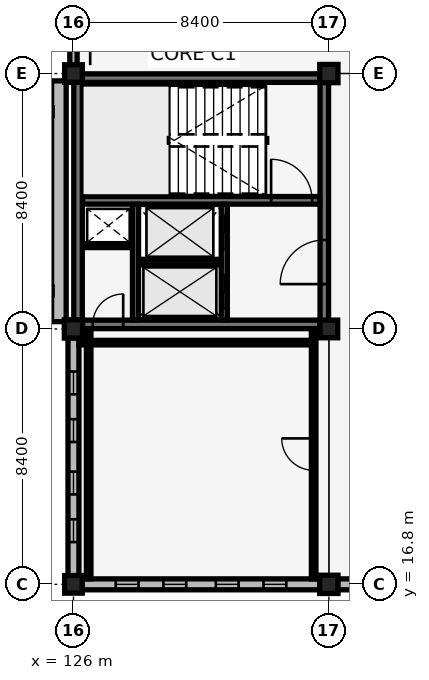
"""IFC4 building model, lengths in metres.
Left out: names, types, materials, properties, quantities, classifications, styles, units other than length and angle.
Written with IfcOpenShell. Run it as: python <this file> out.ifc"""

import sys

from ifc_helpers import new_model, si_unit, direction, frame, frame_2d, origin, origin_2d, place, context, subcontext, project, spatial, rectangle, extrude, element, fill, save


model = new_model("IFC4")
c1 = context("Model", 3, precision=1e-05, world=origin(), true_north=direction((0.0, 1.0)))
c2 = subcontext(c1, "Body", "Model", "MODEL_VIEW")
j1 = project(units=[si_unit("LENGTHUNIT", "METRE"), si_unit("PLANEANGLEUNIT", "RADIAN")], contexts=[c1])
p1 = place(None, origin())
s1 = spatial("IfcSite", under=j1, at=p1, CompositionType="ELEMENT")
p2 = place(p1, origin())
s2 = spatial("IfcBuilding", under=s1, at=p2, CompositionType="ELEMENT")
p3 = place(p2, frame((0.0, 0.0, 18.02)))
s3 = spatial("IfcBuildingStorey", under=s2, at=p3, CompositionType="ELEMENT", Elevation=18.02)
p4 = place(p3, frame((126.15, 25.35, 0.0), z_axis=(0.0, 0.0, 1.0), x_axis=(1.0, 0.0, 0.0)))
e1 = element("IfcWall", 1, at=p4, inside=s3, PredefinedType="SHEAR", context=c2, shape_type="SweptSolid", body=[
    extrude(rectangle(XDim=8.1, YDim=0.28, at=frame_2d((4.05, 0.0))), origin(), (0.0, 0.0, 1.0), 3.78),
])
p5 = place(p4, frame((0.485, 0.0, 0.0)))
e2 = element("IfcOpeningElement", 2, at=p5, cuts=e1, PredefinedType="OPENING", context=c2, shape_type="SweptSolid", body=[
    extrude(rectangle(XDim=1.0, YDim=2.15, at=frame_2d((0.5, 1.075))), frame((0.0, 0.15, 0.0), z_axis=(0.0, -1.0, 0.0), x_axis=(1.0, 0.0, 0.0)), (0.0, 0.0, 1.0), 0.3),
])
p6 = place(p3, frame((126.15, 33.45, 0.0), z_axis=(0.0, 0.0, 1.0), x_axis=(1.0, 0.0, 0.0)))
e3 = element("IfcWall", 3, at=p6, inside=s3, PredefinedType="SHEAR", context=c2, shape_type="SweptSolid", body=[
    extrude(rectangle(XDim=8.1, YDim=0.28, at=frame_2d((4.05, 0.0))), origin(), (0.0, 0.0, 1.0), 3.78),
])
p7 = place(p3, frame((126.15, 25.35, 0.0), z_axis=(0.0, 0.0, 1.0), x_axis=(0.0, 1.0, 0.0)))
e4 = element("IfcWall", 4, at=p7, inside=s3, PredefinedType="SHEAR", context=c2, shape_type="SweptSolid", body=[
    extrude(rectangle(XDim=8.1, YDim=0.28, at=frame_2d((4.05, 0.0))), origin(), (0.0, 0.0, 1.0), 3.78),
])
p8 = place(p3, frame((134.25, 25.35, 0.0), z_axis=(0.0, 0.0, 1.0), x_axis=(0.0, 1.0, 0.0)))
e5 = element("IfcWall", 5, at=p8, inside=s3, PredefinedType="SHEAR", context=c2, shape_type="SweptSolid", body=[
    extrude(rectangle(XDim=8.1, YDim=0.28, at=frame_2d((4.05, 0.0))), origin(), (0.0, 0.0, 1.0), 3.78),
])
p9 = place(p8, frame((1.325, 0.0, 0.0)))
e6 = element("IfcOpeningElement", 6, at=p9, cuts=e5, PredefinedType="OPENING", context=c2, shape_type="SweptSolid", body=[
    extrude(rectangle(XDim=1.45, YDim=2.15, at=frame_2d((0.725, 1.075))), frame((0.0, 0.15, 0.0), z_axis=(0.0, -1.0, 0.0), x_axis=(1.0, 0.0, 0.0)), (0.0, 0.0, 1.0), 0.3),
])
p10 = place(p3, frame((126.3, 29.43, 0.0), z_axis=(0.0, 0.0, 1.0), x_axis=(1.0, 0.0, 0.0)))
e7 = element("IfcWall", 7, at=p10, inside=s3, PredefinedType="SHEAR", context=c2, shape_type="SweptSolid", body=[
    extrude(rectangle(XDim=7.8, YDim=0.25, at=frame_2d((3.9, 0.0))), origin(), (0.0, 0.0, 1.0), 3.78),
])
p11 = place(p10, frame((6.2, 0.0, 0.0)))
e8 = element("IfcOpeningElement", 8, at=p11, cuts=e7, PredefinedType="OPENING", context=c2, shape_type="SweptSolid", body=[
    extrude(rectangle(XDim=1.35, YDim=2.15, at=frame_2d((0.675, 1.075))), frame((0.0, 0.135, 0.0), z_axis=(0.0, -1.0, 0.0), x_axis=(1.0, 0.0, 0.0)), (0.0, 0.0, 1.0), 0.27),
])
p12 = place(p3, frame((126.0, 16.8, 0.0), z_axis=(0.0, 0.0, 1.0), x_axis=(1.0, 0.0, 0.0)))
e9 = element("IfcColumn", 9, at=p12, inside=s3, PredefinedType="COLUMN", context=c2, shape_type="SweptSolid", body=[
    extrude(rectangle(XDim=0.58, YDim=0.58, at=origin_2d()), origin(), (0.0, 0.0, 1.0), 3.78),
])
p13 = place(p3, frame((126.0, 25.2, 0.0), z_axis=(0.0, 0.0, 1.0), x_axis=(1.0, 0.0, 0.0)))
e10 = element("IfcColumn", 10, at=p13, inside=s3, PredefinedType="COLUMN", context=c2, shape_type="SweptSolid", body=[
    extrude(rectangle(XDim=0.6, YDim=0.6, at=origin_2d()), origin(), (0.0, 0.0, 1.0), 3.78),
])
p14 = place(p3, frame((126.0, 33.6, 0.0), z_axis=(0.0, 0.0, 1.0), x_axis=(1.0, 0.0, 0.0)))
e11 = element("IfcColumn", 11, at=p14, inside=s3, PredefinedType="COLUMN", context=c2, shape_type="SweptSolid", body=[
    extrude(rectangle(XDim=0.58, YDim=0.58, at=origin_2d()), origin(), (0.0, 0.0, 1.0), 3.78),
])
p15 = place(p3, frame((134.4, 16.8, 0.0), z_axis=(0.0, 0.0, 1.0), x_axis=(1.0, 0.0, 0.0)))
e12 = element("IfcColumn", 12, at=p15, inside=s3, PredefinedType="COLUMN", context=c2, shape_type="SweptSolid", body=[
    extrude(rectangle(XDim=0.6, YDim=0.6, at=origin_2d()), origin(), (0.0, 0.0, 1.0), 3.78),
])
p16 = place(p3, frame((134.4, 25.2, 0.0), z_axis=(0.0, 0.0, 1.0), x_axis=(1.0, 0.0, 0.0)))
e13 = element("IfcColumn", 13, at=p16, inside=s3, PredefinedType="COLUMN", context=c2, shape_type="SweptSolid", body=[
    extrude(rectangle(XDim=0.58, YDim=0.58, at=origin_2d()), origin(), (0.0, 0.0, 1.0), 3.78),
])
p17 = place(p3, frame((134.4, 33.6, 0.0), z_axis=(0.0, 0.0, 1.0), x_axis=(1.0, 0.0, 0.0)))
e14 = element("IfcColumn", 14, at=p17, inside=s3, PredefinedType="COLUMN", context=c2, shape_type="SweptSolid", body=[
    extrude(rectangle(XDim=0.6, YDim=0.6, at=origin_2d()), origin(), (0.0, 0.0, 1.0), 3.78),
])
p18 = place(p3, frame((126.275, 16.8, 0.0), z_axis=(0.0, 0.0, 1.0), x_axis=(1.0, 0.0, 0.0)))
e15 = element("IfcWall", 15, at=p18, inside=s3, PredefinedType="SOLIDWALL", context=c2, shape_type="SweptSolid", body=[
    extrude(rectangle(XDim=7.84, YDim=0.36, at=frame_2d((3.92, 0.0))), origin(), (0.0, 0.0, 1.0), 3.18),
])
p19 = place(p18, frame((1.115, 0.0, 0.7)))
e16 = element("IfcOpeningElement", 16, at=p19, cuts=e15, PredefinedType="OPENING", context=c2, shape_type="SweptSolid", body=[
    extrude(rectangle(XDim=0.75, YDim=2.1, at=frame_2d((0.375, 1.05))), frame((0.0, 0.19, 0.0), z_axis=(0.0, -1.0, 0.0), x_axis=(1.0, 0.0, 0.0)), (0.0, 0.0, 1.0), 0.38),
])
p20 = place(p18, frame((2.683, 0.0, 0.7)))
e17 = element("IfcOpeningElement", 17, at=p20, cuts=e15, PredefinedType="OPENING", context=c2, shape_type="SweptSolid", body=[
    extrude(rectangle(XDim=0.75, YDim=2.1, at=frame_2d((0.375, 1.05))), frame((0.0, 0.19, 0.0), z_axis=(0.0, -1.0, 0.0), x_axis=(1.0, 0.0, 0.0)), (0.0, 0.0, 1.0), 0.38),
])
p21 = place(p18, frame((4.407, 0.0, 0.7)))
e18 = element("IfcOpeningElement", 18, at=p21, cuts=e15, PredefinedType="OPENING", context=c2, shape_type="SweptSolid", body=[
    extrude(rectangle(XDim=0.75, YDim=2.1, at=frame_2d((0.375, 1.05))), frame((0.0, 0.19, 0.0), z_axis=(0.0, -1.0, 0.0), x_axis=(1.0, 0.0, 0.0)), (0.0, 0.0, 1.0), 0.38),
])
p22 = place(p18, frame((5.975, 0.0, 0.7)))
e19 = element("IfcOpeningElement", 19, at=p22, cuts=e15, PredefinedType="OPENING", context=c2, shape_type="SweptSolid", body=[
    extrude(rectangle(XDim=0.75, YDim=2.1, at=frame_2d((0.375, 1.05))), frame((0.0, 0.19, 0.0), z_axis=(0.0, -1.0, 0.0), x_axis=(1.0, 0.0, 0.0)), (0.0, 0.0, 1.0), 0.38),
])
p23 = place(p3, frame((126.0, 17.075, 0.0), z_axis=(0.0, 0.0, 1.0), x_axis=(0.0, 1.0, 0.0)))
e20 = element("IfcWall", 20, at=p23, inside=s3, PredefinedType="SOLIDWALL", context=c2, shape_type="SweptSolid", body=[
    extrude(rectangle(XDim=7.84, YDim=0.36, at=frame_2d((3.92, 0.0))), origin(), (0.0, 0.0, 1.0), 3.18),
])
p24 = place(p23, frame((1.115, 0.0, 0.7)))
e21 = element("IfcOpeningElement", 21, at=p24, cuts=e20, PredefinedType="OPENING", context=c2, shape_type="SweptSolid", body=[
    extrude(rectangle(XDim=0.75, YDim=2.1, at=frame_2d((0.375, 1.05))), frame((0.0, 0.19, 0.0), z_axis=(0.0, -1.0, 0.0), x_axis=(1.0, 0.0, 0.0)), (0.0, 0.0, 1.0), 0.38),
])
p25 = place(p23, frame((2.683, 0.0, 0.7)))
e22 = element("IfcOpeningElement", 22, at=p25, cuts=e20, PredefinedType="OPENING", context=c2, shape_type="SweptSolid", body=[
    extrude(rectangle(XDim=0.75, YDim=2.1, at=frame_2d((0.375, 1.05))), frame((0.0, 0.19, 0.0), z_axis=(0.0, -1.0, 0.0), x_axis=(1.0, 0.0, 0.0)), (0.0, 0.0, 1.0), 0.38),
])
p26 = place(p23, frame((4.407, 0.0, 0.7)))
e23 = element("IfcOpeningElement", 23, at=p26, cuts=e20, PredefinedType="OPENING", context=c2, shape_type="SweptSolid", body=[
    extrude(rectangle(XDim=0.75, YDim=2.1, at=frame_2d((0.375, 1.05))), frame((0.0, 0.19, 0.0), z_axis=(0.0, -1.0, 0.0), x_axis=(1.0, 0.0, 0.0)), (0.0, 0.0, 1.0), 0.38),
])
p27 = place(p23, frame((5.975, 0.0, 0.7)))
e24 = element("IfcOpeningElement", 24, at=p27, cuts=e20, PredefinedType="OPENING", context=c2, shape_type="SweptSolid", body=[
    extrude(rectangle(XDim=0.75, YDim=2.1, at=frame_2d((0.375, 1.05))), frame((0.0, 0.19, 0.0), z_axis=(0.0, -1.0, 0.0), x_axis=(1.0, 0.0, 0.0)), (0.0, 0.0, 1.0), 0.38),
])
p28 = place(p3, frame((125.52, 25.44, 0.0), z_axis=(0.0, 0.0, 1.0), x_axis=(0.0, 1.0, 0.0)))
e25 = element("IfcWall", 25, at=p28, inside=s3, PredefinedType="SOLIDWALL", context=c2, shape_type="SweptSolid", body=[
    extrude(rectangle(XDim=7.92, YDim=0.48, at=frame_2d((3.96, 0.0))), origin(), (0.0, 0.0, 1.0), 4.08),
])
p29 = place(p3, frame((126.0, 33.875, 0.0), z_axis=(0.0, 0.0, 1.0), x_axis=(0.0, 1.0, 0.0)))
e26 = element("IfcWall", 26, at=p29, inside=s3, PredefinedType="SOLIDWALL", context=c2, shape_type="SweptSolid", body=[
    extrude(rectangle(XDim=7.84, YDim=0.24, at=frame_2d((3.92, 0.0))), origin(), (0.0, 0.0, 1.0), 3.18),
])
p30 = place(p29, frame((0.804, 0.0, 0.35)))
e27 = element("IfcOpeningElement", 27, at=p30, cuts=e26, PredefinedType="OPENING", context=c2, shape_type="SweptSolid", body=[
    extrude(rectangle(XDim=0.44, YDim=1.25, at=frame_2d((0.22, 0.625))), frame((0.0, 0.13, 0.0), z_axis=(0.0, -1.0, 0.0), x_axis=(1.0, 0.0, 0.0)), (0.0, 0.0, 1.0), 0.26),
])
p31 = place(p29, frame((2.252, 0.0, 0.35)))
e28 = element("IfcOpeningElement", 28, at=p31, cuts=e26, PredefinedType="OPENING", context=c2, shape_type="SweptSolid", body=[
    extrude(rectangle(XDim=0.44, YDim=1.25, at=frame_2d((0.22, 0.625))), frame((0.0, 0.13, 0.0), z_axis=(0.0, -1.0, 0.0), x_axis=(1.0, 0.0, 0.0)), (0.0, 0.0, 1.0), 0.26),
])
p32 = place(p29, frame((3.7, 0.0, 0.35)))
e29 = element("IfcOpeningElement", 29, at=p32, cuts=e26, PredefinedType="OPENING", context=c2, shape_type="SweptSolid", body=[
    extrude(rectangle(XDim=0.44, YDim=1.25, at=frame_2d((0.22, 0.625))), frame((0.0, 0.13, 0.0), z_axis=(0.0, -1.0, 0.0), x_axis=(1.0, 0.0, 0.0)), (0.0, 0.0, 1.0), 0.26),
])
p33 = place(p29, frame((5.148, 0.0, 0.35)))
e30 = element("IfcOpeningElement", 30, at=p33, cuts=e26, PredefinedType="OPENING", context=c2, shape_type="SweptSolid", body=[
    extrude(rectangle(XDim=0.44, YDim=1.25, at=frame_2d((0.22, 0.625))), frame((0.0, 0.13, 0.0), z_axis=(0.0, -1.0, 0.0), x_axis=(1.0, 0.0, 0.0)), (0.0, 0.0, 1.0), 0.26),
])
p34 = place(p29, frame((6.596, 0.0, 0.35)))
e31 = element("IfcOpeningElement", 31, at=p34, cuts=e26, PredefinedType="OPENING", context=c2, shape_type="SweptSolid", body=[
    extrude(rectangle(XDim=0.44, YDim=1.25, at=frame_2d((0.22, 0.625))), frame((0.0, 0.13, 0.0), z_axis=(0.0, -1.0, 0.0), x_axis=(1.0, 0.0, 0.0)), (0.0, 0.0, 1.0), 0.26),
])
p35 = place(p3, frame((134.685, 16.8, 0.0), z_axis=(0.0, 0.0, 1.0), x_axis=(1.0, 0.0, 0.0)))
e32 = element("IfcWall", 32, at=p35, inside=s3, PredefinedType="SOLIDWALL", context=c2, shape_type="SweptSolid", body=[
    extrude(rectangle(XDim=7.84, YDim=0.36, at=frame_2d((3.92, 0.0))), origin(), (0.0, 0.0, 1.0), 3.18),
])
p36 = place(p35, frame((1.115, 0.0, 0.7)))
e33 = element("IfcOpeningElement", 33, at=p36, cuts=e32, PredefinedType="OPENING", context=c2, shape_type="SweptSolid", body=[
    extrude(rectangle(XDim=0.75, YDim=2.1, at=frame_2d((0.375, 1.05))), frame((0.0, 0.19, 0.0), z_axis=(0.0, -1.0, 0.0), x_axis=(1.0, 0.0, 0.0)), (0.0, 0.0, 1.0), 0.38),
])
p37 = place(p35, frame((4.407, 0.0, 0.7)))
e34 = element("IfcOpeningElement", 34, at=p37, cuts=e32, PredefinedType="OPENING", context=c2, shape_type="SweptSolid", body=[
    extrude(rectangle(XDim=0.75, YDim=2.1, at=frame_2d((0.375, 1.05))), frame((0.0, 0.19, 0.0), z_axis=(0.0, -1.0, 0.0), x_axis=(1.0, 0.0, 0.0)), (0.0, 0.0, 1.0), 0.38),
])
p38 = place(p35, frame((5.975, 0.0, 0.7)))
e35 = element("IfcOpeningElement", 35, at=p38, cuts=e32, PredefinedType="OPENING", context=c2, shape_type="SweptSolid", body=[
    extrude(rectangle(XDim=0.75, YDim=2.1, at=frame_2d((0.375, 1.05))), frame((0.0, 0.19, 0.0), z_axis=(0.0, -1.0, 0.0), x_axis=(1.0, 0.0, 0.0)), (0.0, 0.0, 1.0), 0.38),
])
p39 = place(p3, frame((130.96, 25.5, 0.0), z_axis=(0.0, 0.0, 1.0), x_axis=(0.0, 1.0, 0.0)))
e36 = element("IfcWall", 36, at=p39, inside=s3, PredefinedType="SHEAR", context=c2, shape_type="SweptSolid", body=[
    extrude(rectangle(XDim=3.8, YDim=0.2, at=frame_2d((1.9, 0.0))), origin(), (0.0, 0.0, 1.0), 3.78),
])
p40 = place(p39, frame((0.375, 0.0, 0.0)))
e37 = element("IfcOpeningElement", 37, at=p40, cuts=e36, PredefinedType="OPENING", context=c2, shape_type="SweptSolid", body=[
    extrude(rectangle(XDim=1.1, YDim=2.15, at=frame_2d((0.55, 1.075))), frame((0.0, 0.11, 0.0), z_axis=(0.0, -1.0, 0.0), x_axis=(1.0, 0.0, 0.0)), (0.0, 0.0, 1.0), 0.22),
])
p41 = place(p39, frame((2.325, 0.0, 0.0)))
e38 = element("IfcOpeningElement", 38, at=p41, cuts=e36, PredefinedType="OPENING", context=c2, shape_type="SweptSolid", body=[
    extrude(rectangle(XDim=1.1, YDim=2.15, at=frame_2d((0.55, 1.075))), frame((0.0, 0.11, 0.0), z_axis=(0.0, -1.0, 0.0), x_axis=(1.0, 0.0, 0.0)), (0.0, 0.0, 1.0), 0.22),
])
p42 = place(p3, frame((128.04, 25.5, 0.0), z_axis=(0.0, 0.0, 1.0), x_axis=(0.0, 1.0, 0.0)))
e39 = element("IfcWall", 39, at=p42, inside=s3, PredefinedType="SHEAR", context=c2, shape_type="SweptSolid", body=[
    extrude(rectangle(XDim=3.8, YDim=0.2, at=frame_2d((1.9, 0.0))), origin(), (0.0, 0.0, 1.0), 3.78),
])
p43 = place(p3, frame((128.15, 27.4, 0.0), z_axis=(0.0, 0.0, 1.0), x_axis=(1.0, 0.0, 0.0)))
e40 = element("IfcWall", 40, at=p43, inside=s3, PredefinedType="SHEAR", context=c2, shape_type="SweptSolid", body=[
    extrude(rectangle(XDim=2.7, YDim=0.18, at=frame_2d((1.35, 0.0))), origin(), (0.0, 0.0, 1.0), 3.78),
])
p44 = place(p3, frame((126.32, 27.94, 0.0), z_axis=(0.0, 0.0, 1.0), x_axis=(1.0, 0.0, 0.0)))
e41 = element("IfcWall", 41, at=p44, inside=s3, PredefinedType="PARTITIONING", context=c2, shape_type="SweptSolid", body=[
    extrude(rectangle(XDim=1.62, YDim=0.13, at=frame_2d((0.81, 0.0))), origin(), (0.0, 0.0, 1.0), 3.78),
])
p45 = place(p3, frame((126.18, 24.75, 0.0), z_axis=(0.0, 0.0, 1.0), x_axis=(1.0, 0.0, 0.0)))
e42 = element("IfcWall", 42, at=p45, inside=s3, PredefinedType="PARTITIONING", context=c2, shape_type="SweptSolid", body=[
    extrude(rectangle(XDim=7.57, YDim=0.15, at=frame_2d((3.785, 0.0))), origin(), (0.0, 0.0, 1.0), 3.18),
])
p46 = place(p3, frame((133.9, 16.98, 0.0), z_axis=(0.0, 0.0, 1.0), x_axis=(0.0, 1.0, 0.0)))
e43 = element("IfcWall", 43, at=p46, inside=s3, PredefinedType="PARTITIONING", context=c2, shape_type="SweptSolid", body=[
    extrude(rectangle(XDim=8.19, YDim=0.15, at=frame_2d((4.095, 0.0))), origin(), (0.0, 0.0, 1.0), 3.16),
])
p47 = place(p46, frame((3.57, 0.0, 0.0)))
e44 = element("IfcOpeningElement", 44, at=p47, cuts=e43, PredefinedType="OPENING", context=c2, shape_type="SweptSolid", body=[
    extrude(rectangle(XDim=1.05, YDim=2.15, at=frame_2d((0.525, 1.075))), frame((0.0, 0.085, 0.0), z_axis=(0.0, -1.0, 0.0), x_axis=(1.0, 0.0, 0.0)), (0.0, 0.0, 1.0), 0.17),
])
p48 = place(p3, frame((126.5, 16.98, 0.0), z_axis=(0.0, 0.0, 1.0), x_axis=(0.0, 1.0, 0.0)))
e45 = element("IfcWall", 45, at=p48, inside=s3, PredefinedType="PARTITIONING", context=c2, shape_type="SweptSolid", body=[
    extrude(rectangle(XDim=8.19, YDim=0.15, at=frame_2d((4.095, 0.0))), origin(), (0.0, 0.0, 1.0), 3.16),
])
p49 = place(p19, origin())
e46 = element("IfcWindow", 46, at=p49, inside=s3, PartitioningType="DOUBLE_PANEL_VERTICAL", PredefinedType="WINDOW", context=c2, shape_type="SweptSolid", body=[
    extrude(rectangle(XDim=0.75, YDim=2.1, at=frame_2d((0.375, 1.05))), frame((0.0, 0.03, 0.0), z_axis=(0.0, -1.0, 0.0), x_axis=(1.0, 0.0, 0.0)), (0.0, 0.0, 1.0), 0.06),
])
fill(e16, e46)
p50 = place(p20, origin())
e47 = element("IfcWindow", 47, at=p50, inside=s3, PartitioningType="DOUBLE_PANEL_VERTICAL", PredefinedType="WINDOW", context=c2, shape_type="SweptSolid", body=[
    extrude(rectangle(XDim=0.75, YDim=2.1, at=frame_2d((0.375, 1.05))), frame((0.0, 0.03, 0.0), z_axis=(0.0, -1.0, 0.0), x_axis=(1.0, 0.0, 0.0)), (0.0, 0.0, 1.0), 0.06),
])
fill(e17, e47)
p51 = place(p21, origin())
e48 = element("IfcWindow", 48, at=p51, inside=s3, PartitioningType="DOUBLE_PANEL_VERTICAL", PredefinedType="WINDOW", context=c2, shape_type="SweptSolid", body=[
    extrude(rectangle(XDim=0.75, YDim=2.1, at=frame_2d((0.375, 1.05))), frame((0.0, 0.03, 0.0), z_axis=(0.0, -1.0, 0.0), x_axis=(1.0, 0.0, 0.0)), (0.0, 0.0, 1.0), 0.06),
])
fill(e18, e48)
p52 = place(p22, origin())
e49 = element("IfcWindow", 49, at=p52, inside=s3, PartitioningType="DOUBLE_PANEL_VERTICAL", PredefinedType="WINDOW", context=c2, shape_type="SweptSolid", body=[
    extrude(rectangle(XDim=0.75, YDim=2.1, at=frame_2d((0.375, 1.05))), frame((0.0, 0.03, 0.0), z_axis=(0.0, -1.0, 0.0), x_axis=(1.0, 0.0, 0.0)), (0.0, 0.0, 1.0), 0.06),
])
fill(e19, e49)
p53 = place(p24, origin())
e50 = element("IfcWindow", 50, at=p53, inside=s3, PartitioningType="DOUBLE_PANEL_VERTICAL", PredefinedType="WINDOW", context=c2, shape_type="SweptSolid", body=[
    extrude(rectangle(XDim=0.75, YDim=2.1, at=frame_2d((0.375, 1.05))), frame((0.0, 0.03, 0.0), z_axis=(0.0, -1.0, 0.0), x_axis=(1.0, 0.0, 0.0)), (0.0, 0.0, 1.0), 0.06),
])
fill(e21, e50)
p54 = place(p25, origin())
e51 = element("IfcWindow", 51, at=p54, inside=s3, PartitioningType="DOUBLE_PANEL_VERTICAL", PredefinedType="WINDOW", context=c2, shape_type="SweptSolid", body=[
    extrude(rectangle(XDim=0.75, YDim=2.1, at=frame_2d((0.375, 1.05))), frame((0.0, 0.03, 0.0), z_axis=(0.0, -1.0, 0.0), x_axis=(1.0, 0.0, 0.0)), (0.0, 0.0, 1.0), 0.06),
])
fill(e22, e51)
p55 = place(p26, origin())
e52 = element("IfcWindow", 52, at=p55, inside=s3, PartitioningType="DOUBLE_PANEL_VERTICAL", PredefinedType="WINDOW", context=c2, shape_type="SweptSolid", body=[
    extrude(rectangle(XDim=0.75, YDim=2.1, at=frame_2d((0.375, 1.05))), frame((0.0, 0.03, 0.0), z_axis=(0.0, -1.0, 0.0), x_axis=(1.0, 0.0, 0.0)), (0.0, 0.0, 1.0), 0.06),
])
fill(e23, e52)
p56 = place(p27, origin())
e53 = element("IfcWindow", 53, at=p56, inside=s3, PartitioningType="DOUBLE_PANEL_VERTICAL", PredefinedType="WINDOW", context=c2, shape_type="SweptSolid", body=[
    extrude(rectangle(XDim=0.75, YDim=2.1, at=frame_2d((0.375, 1.05))), frame((0.0, 0.03, 0.0), z_axis=(0.0, -1.0, 0.0), x_axis=(1.0, 0.0, 0.0)), (0.0, 0.0, 1.0), 0.06),
])
fill(e24, e53)
p57 = place(p11, origin())
e54 = element("IfcDoor", 54, at=p57, inside=s3, OperationType="SINGLE_SWING_LEFT", PredefinedType="DOOR", context=c2, shape_type="SweptSolid", body=[
    extrude(rectangle(XDim=1.35, YDim=2.15, at=frame_2d((0.675, 1.075))), frame((0.0, 0.025, 0.0), z_axis=(0.0, -1.0, 0.0), x_axis=(1.0, 0.0, 0.0)), (0.0, 0.0, 1.0), 0.05),
])
fill(e8, e54)
p58 = place(p40, origin())
e55 = element("IfcDoor", 55, at=p58, inside=s3, OperationType="SLIDING_TO_LEFT", PredefinedType="DOOR", context=c2, shape_type="SweptSolid", body=[
    extrude(rectangle(XDim=1.1, YDim=2.15, at=frame_2d((0.55, 1.075))), frame((0.0, 0.025, 0.0), z_axis=(0.0, -1.0, 0.0), x_axis=(1.0, 0.0, 0.0)), (0.0, 0.0, 1.0), 0.05),
])
fill(e37, e55)
p59 = place(p41, origin())
e56 = element("IfcDoor", 56, at=p59, inside=s3, OperationType="SLIDING_TO_LEFT", PredefinedType="DOOR", context=c2, shape_type="SweptSolid", body=[
    extrude(rectangle(XDim=1.1, YDim=2.15, at=frame_2d((0.55, 1.075))), frame((0.0, 0.025, 0.0), z_axis=(0.0, -1.0, 0.0), x_axis=(1.0, 0.0, 0.0)), (0.0, 0.0, 1.0), 0.05),
])
fill(e38, e56)
p60 = place(p9, origin())
e57 = element("IfcDoor", 57, at=p60, inside=s3, OperationType="DOUBLE_DOOR_SINGLE_SWING", PredefinedType="DOOR", context=c2, shape_type="SweptSolid", body=[
    extrude(rectangle(XDim=1.45, YDim=2.15, at=frame_2d((0.725, 1.075))), frame((0.0, 0.025, 0.0), z_axis=(0.0, -1.0, 0.0), x_axis=(1.0, 0.0, 0.0)), (0.0, 0.0, 1.0), 0.05),
])
fill(e6, e57)
p61 = place(p5, origin())
e58 = element("IfcDoor", 58, at=p61, inside=s3, OperationType="SINGLE_SWING_RIGHT", PredefinedType="DOOR", context=c2, shape_type="SweptSolid", body=[
    extrude(rectangle(XDim=1.0, YDim=2.15, at=frame_2d((0.5, 1.075))), frame((0.0, 0.025, 0.0), z_axis=(0.0, -1.0, 0.0), x_axis=(1.0, 0.0, 0.0)), (0.0, 0.0, 1.0), 0.05),
])
fill(e2, e58)
p62 = place(p47, origin())
e59 = element("IfcDoor", 59, at=p62, inside=s3, OperationType="SINGLE_SWING_RIGHT", PredefinedType="DOOR", context=c2, shape_type="SweptSolid", body=[
    extrude(rectangle(XDim=1.05, YDim=2.15, at=frame_2d((0.525, 1.075))), frame((0.0, 0.025, 0.0), z_axis=(0.0, -1.0, 0.0), x_axis=(1.0, 0.0, 0.0)), (0.0, 0.0, 1.0), 0.05),
])
fill(e44, e59)
save(model, sys.argv[1])
